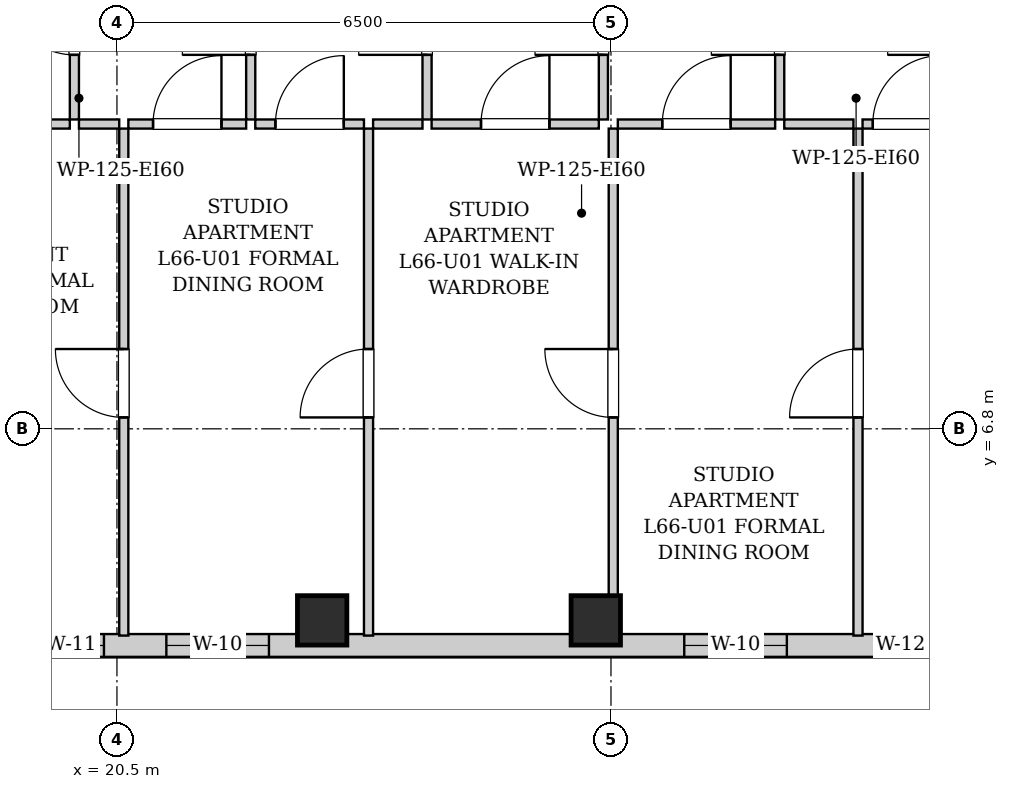
"""IFC4 building model, lengths in metres.
Left out: names, types, materials, properties, quantities, classifications, styles, units other than length and angle.
Written with IfcOpenShell. Run it as: python <this file> out.ifc"""

import sys

from ifc_helpers import new_model, si_unit, direction, frame, frame_2d, origin, origin_2d, place, context, subcontext, project, spatial, rectangle, extrude, element, fill, save


model = new_model("IFC4")
c1 = context("Model", 3, precision=1e-05, world=origin(), true_north=direction((0.0, 1.0)))
c2 = subcontext(c1, "Body", "Model", "MODEL_VIEW")
j1 = project(units=[si_unit("LENGTHUNIT", "METRE"), si_unit("PLANEANGLEUNIT", "RADIAN")], contexts=[c1])
p1 = place(None, origin())
s1 = spatial("IfcSite", under=j1, at=p1, CompositionType="ELEMENT")
p2 = place(p1, origin())
s2 = spatial("IfcBuilding", under=s1, at=p2, CompositionType="ELEMENT")
p3 = place(p2, frame((0.0, 0.0, 227.5)))
s3 = spatial("IfcBuildingStorey", under=s2, at=p3, CompositionType="ELEMENT", Elevation=227.5)
for number, where, z_axis, x_axis in (
    (1, (23.2, 4.28, 0.0), (0.0, 0.0, 1.0), (1.0, 0.0, 0.0)),
    (2, (26.8, 4.28, 0.0), (0.0, 0.0, 1.0), (1.0, 0.0, 0.0)),
):
    element("IfcColumn", number, at=place(p3, frame(where, z_axis=z_axis, x_axis=x_axis)), inside=s3, PredefinedType="COLUMN", context=c2, shape_type="SweptSolid", body=[
        extrude(rectangle(XDim=0.65, YDim=0.65, at=origin_2d()), origin(), (0.0, 0.0, 1.0), 3.4),
    ])
p4 = place(p3, frame((31.5, 3.95, 0.0), z_axis=(0.0, 0.0, 1.0), x_axis=(-1.0, 0.0, 0.0)))
e3 = element("IfcWall", 3, at=p4, inside=s3, PredefinedType="SOLIDWALL", context=c2, shape_type="SweptSolid", body=[
    extrude(rectangle(XDim=12.5, YDim=0.3, at=frame_2d((6.25, 0.0))), origin(), (0.0, 0.0, 1.0), 3.14),
])
p5 = place(p4, frame((11.171, 0.0, 0.55)))
e4 = element("IfcOpeningElement", 4, at=p5, cuts=e3, PredefinedType="OPENING", context=c2, shape_type="SweptSolid", body=[
    extrude(rectangle(XDim=0.85, YDim=1.2, at=frame_2d((0.425, 0.6))), frame((0.0, 0.16, 0.0), z_axis=(0.0, -1.0, 0.0), x_axis=(1.0, 0.0, 0.0)), (0.0, 0.0, 1.0), 0.32),
])
p6 = place(p4, frame((9.0, 0.0, 0.55)))
e5 = element("IfcOpeningElement", 5, at=p6, cuts=e3, PredefinedType="OPENING", context=c2, shape_type="SweptSolid", body=[
    extrude(rectangle(XDim=1.35, YDim=1.2, at=frame_2d((0.675, 0.6))), frame((0.0, 0.16, 0.0), z_axis=(0.0, -1.0, 0.0), x_axis=(1.0, 0.0, 0.0)), (0.0, 0.0, 1.0), 0.32),
])
p7 = place(p4, frame((2.186, 0.0, 0.55)))
e6 = element("IfcOpeningElement", 6, at=p7, cuts=e3, PredefinedType="OPENING", context=c2, shape_type="SweptSolid", body=[
    extrude(rectangle(XDim=1.35, YDim=1.2, at=frame_2d((0.675, 0.6))), frame((0.0, 0.16, 0.0), z_axis=(0.0, -1.0, 0.0), x_axis=(1.0, 0.0, 0.0)), (0.0, 0.0, 1.0), 0.32),
])
p8 = place(p4, frame((0.35, 0.0, 0.55)))
e7 = element("IfcOpeningElement", 7, at=p8, cuts=e3, PredefinedType="OPENING", context=c2, shape_type="SweptSolid", body=[
    extrude(rectangle(XDim=0.68, YDim=1.2, at=frame_2d((0.34, 0.6))), frame((0.0, 0.16, 0.0), z_axis=(0.0, -1.0, 0.0), x_axis=(1.0, 0.0, 0.0)), (0.0, 0.0, 1.0), 0.32),
])
p9 = place(p3, frame((19.94, 10.87, 0.0), z_axis=(0.0, 0.0, 1.0), x_axis=(0.0, 1.0, 0.0)))
e8 = element("IfcWall", 8, at=p9, inside=s3, PredefinedType="PARTITIONING", context=c2, shape_type="SweptSolid", body=[
    extrude(rectangle(XDim=2.6, YDim=0.12, at=frame_2d((1.3, 0.0))), origin(), (0.0, 0.0, 1.0), 3.14),
])
p10 = place(p9, frame((0.85, 0.0, 0.0)))
e9 = element("IfcOpeningElement", 9, at=p10, cuts=e8, PredefinedType="OPENING", context=c2, shape_type="SweptSolid", body=[
    extrude(rectangle(XDim=0.9, YDim=2.05, at=frame_2d((0.45, 1.025))), frame((0.0, 0.07, 0.0), z_axis=(0.0, -1.0, 0.0), x_axis=(1.0, 0.0, 0.0)), (0.0, 0.0, 1.0), 0.14),
])
p11 = place(p3, frame((17.43, 10.81, 0.0), z_axis=(0.0, 0.0, 1.0), x_axis=(1.0, 0.0, 0.0)))
e10 = element("IfcWall", 10, at=p11, inside=s3, PredefinedType="PARTITIONING", context=c2, shape_type="SweptSolid", body=[
    extrude(rectangle(XDim=2.45, YDim=0.12, at=frame_2d((1.225, 0.0))), origin(), (0.0, 0.0, 1.0), 3.14),
])
p12 = place(p11, frame((0.775, 0.0, 0.0)))
e11 = element("IfcOpeningElement", 11, at=p12, cuts=e10, PredefinedType="OPENING", context=c2, shape_type="SweptSolid", body=[
    extrude(rectangle(XDim=0.9, YDim=2.05, at=frame_2d((0.45, 1.025))), frame((0.0, 0.07, 0.0), z_axis=(0.0, -1.0, 0.0), x_axis=(1.0, 0.0, 0.0)), (0.0, 0.0, 1.0), 0.14),
])
p13 = place(p3, frame((22.26, 10.87, 0.0), z_axis=(0.0, 0.0, 1.0), x_axis=(0.0, 1.0, 0.0)))
e12 = element("IfcWall", 12, at=p13, inside=s3, PredefinedType="PARTITIONING", context=c2, shape_type="SweptSolid", body=[
    extrude(rectangle(XDim=2.6, YDim=0.12, at=frame_2d((1.3, 0.0))), origin(), (0.0, 0.0, 1.0), 3.14),
])
p14 = place(p13, frame((0.85, 0.0, 0.0)))
e13 = element("IfcOpeningElement", 13, at=p14, cuts=e12, PredefinedType="OPENING", context=c2, shape_type="SweptSolid", body=[
    extrude(rectangle(XDim=0.9, YDim=2.05, at=frame_2d((0.45, 1.025))), frame((0.0, 0.07, 0.0), z_axis=(0.0, -1.0, 0.0), x_axis=(1.0, 0.0, 0.0)), (0.0, 0.0, 1.0), 0.14),
])
p15 = place(p3, frame((20.0, 10.81, 0.0), z_axis=(0.0, 0.0, 1.0), x_axis=(1.0, 0.0, 0.0)))
e14 = element("IfcWall", 14, at=p15, inside=s3, PredefinedType="PARTITIONING", context=c2, shape_type="SweptSolid", body=[
    extrude(rectangle(XDim=0.53, YDim=0.12, at=frame_2d((0.265, 0.0))), origin(), (0.0, 0.0, 1.0), 3.14),
])
p16 = place(p3, frame((20.65, 10.81, 0.0), z_axis=(0.0, 0.0, 1.0), x_axis=(1.0, 0.0, 0.0)))
e15 = element("IfcWall", 15, at=p16, inside=s3, PredefinedType="PARTITIONING", context=c2, shape_type="SweptSolid", body=[
    extrude(rectangle(XDim=1.55, YDim=0.12, at=frame_2d((0.775, 0.0))), origin(), (0.0, 0.0, 1.0), 3.14),
])
p17 = place(p16, frame((0.325, 0.0, 0.0)))
e16 = element("IfcOpeningElement", 16, at=p17, cuts=e15, PredefinedType="OPENING", context=c2, shape_type="SweptSolid", body=[
    extrude(rectangle(XDim=0.9, YDim=2.05, at=frame_2d((0.45, 1.025))), frame((0.0, 0.07, 0.0), z_axis=(0.0, -1.0, 0.0), x_axis=(1.0, 0.0, 0.0)), (0.0, 0.0, 1.0), 0.14),
])
p18 = place(p3, frame((24.58, 10.87, 0.0), z_axis=(0.0, 0.0, 1.0), x_axis=(0.0, 1.0, 0.0)))
e17 = element("IfcWall", 17, at=p18, inside=s3, PredefinedType="PARTITIONING", context=c2, shape_type="SweptSolid", body=[
    extrude(rectangle(XDim=2.6, YDim=0.12, at=frame_2d((1.3, 0.0))), origin(), (0.0, 0.0, 1.0), 3.14),
])
p19 = place(p18, frame((0.85, 0.0, 0.0)))
e18 = element("IfcOpeningElement", 18, at=p19, cuts=e17, PredefinedType="OPENING", context=c2, shape_type="SweptSolid", body=[
    extrude(rectangle(XDim=0.9, YDim=2.05, at=frame_2d((0.45, 1.025))), frame((0.0, 0.07, 0.0), z_axis=(0.0, -1.0, 0.0), x_axis=(1.0, 0.0, 0.0)), (0.0, 0.0, 1.0), 0.14),
])
p20 = place(p3, frame((22.32, 10.81, 0.0), z_axis=(0.0, 0.0, 1.0), x_axis=(1.0, 0.0, 0.0)))
e19 = element("IfcWall", 19, at=p20, inside=s3, PredefinedType="PARTITIONING", context=c2, shape_type="SweptSolid", body=[
    extrude(rectangle(XDim=1.43, YDim=0.12, at=frame_2d((0.715, 0.0))), origin(), (0.0, 0.0, 1.0), 3.14),
])
p21 = place(p20, frame((0.265, 0.0, 0.0)))
e20 = element("IfcOpeningElement", 20, at=p21, cuts=e19, PredefinedType="OPENING", context=c2, shape_type="SweptSolid", body=[
    extrude(rectangle(XDim=0.9, YDim=2.05, at=frame_2d((0.45, 1.025))), frame((0.0, 0.07, 0.0), z_axis=(0.0, -1.0, 0.0), x_axis=(1.0, 0.0, 0.0)), (0.0, 0.0, 1.0), 0.14),
])
p22 = place(p3, frame((23.87, 10.81, 0.0), z_axis=(0.0, 0.0, 1.0), x_axis=(1.0, 0.0, 0.0)))
e21 = element("IfcWall", 21, at=p22, inside=s3, PredefinedType="PARTITIONING", context=c2, shape_type="SweptSolid", body=[
    extrude(rectangle(XDim=0.65, YDim=0.12, at=frame_2d((0.325, 0.0))), origin(), (0.0, 0.0, 1.0), 3.14),
])
p23 = place(p3, frame((26.9, 10.87, 0.0), z_axis=(0.0, 0.0, 1.0), x_axis=(0.0, 1.0, 0.0)))
e22 = element("IfcWall", 22, at=p23, inside=s3, PredefinedType="PARTITIONING", context=c2, shape_type="SweptSolid", body=[
    extrude(rectangle(XDim=2.6, YDim=0.12, at=frame_2d((1.3, 0.0))), origin(), (0.0, 0.0, 1.0), 3.14),
])
p24 = place(p23, frame((0.85, 0.0, 0.0)))
e23 = element("IfcOpeningElement", 23, at=p24, cuts=e22, PredefinedType="OPENING", context=c2, shape_type="SweptSolid", body=[
    extrude(rectangle(XDim=0.9, YDim=2.05, at=frame_2d((0.45, 1.025))), frame((0.0, 0.07, 0.0), z_axis=(0.0, -1.0, 0.0), x_axis=(1.0, 0.0, 0.0)), (0.0, 0.0, 1.0), 0.14),
])
p25 = place(p3, frame((24.64, 10.81, 0.0), z_axis=(0.0, 0.0, 1.0), x_axis=(1.0, 0.0, 0.0)))
e24 = element("IfcWall", 24, at=p25, inside=s3, PredefinedType="PARTITIONING", context=c2, shape_type="SweptSolid", body=[
    extrude(rectangle(XDim=2.2, YDim=0.12, at=frame_2d((1.1, 0.0))), origin(), (0.0, 0.0, 1.0), 3.14),
])
p26 = place(p25, frame((0.65, 0.0, 0.0)))
e25 = element("IfcOpeningElement", 25, at=p26, cuts=e24, PredefinedType="OPENING", context=c2, shape_type="SweptSolid", body=[
    extrude(rectangle(XDim=0.9, YDim=2.05, at=frame_2d((0.45, 1.025))), frame((0.0, 0.07, 0.0), z_axis=(0.0, -1.0, 0.0), x_axis=(1.0, 0.0, 0.0)), (0.0, 0.0, 1.0), 0.14),
])
p27 = place(p3, frame((29.22, 10.87, 0.0), z_axis=(0.0, 0.0, 1.0), x_axis=(0.0, 1.0, 0.0)))
e26 = element("IfcWall", 26, at=p27, inside=s3, PredefinedType="PARTITIONING", context=c2, shape_type="SweptSolid", body=[
    extrude(rectangle(XDim=2.6, YDim=0.12, at=frame_2d((1.3, 0.0))), origin(), (0.0, 0.0, 1.0), 3.14),
])
p28 = place(p27, frame((0.85, 0.0, 0.0)))
e27 = element("IfcOpeningElement", 27, at=p28, cuts=e26, PredefinedType="OPENING", context=c2, shape_type="SweptSolid", body=[
    extrude(rectangle(XDim=0.9, YDim=2.05, at=frame_2d((0.45, 1.025))), frame((0.0, 0.07, 0.0), z_axis=(0.0, -1.0, 0.0), x_axis=(1.0, 0.0, 0.0)), (0.0, 0.0, 1.0), 0.14),
])
p29 = place(p3, frame((27.09, 10.81, 0.0), z_axis=(0.0, 0.0, 1.0), x_axis=(1.0, 0.0, 0.0)))
e28 = element("IfcWall", 28, at=p29, inside=s3, PredefinedType="PARTITIONING", context=c2, shape_type="SweptSolid", body=[
    extrude(rectangle(XDim=2.07, YDim=0.12, at=frame_2d((1.035, 0.0))), origin(), (0.0, 0.0, 1.0), 3.14),
])
p30 = place(p29, frame((0.585, 0.0, 0.0)))
e29 = element("IfcOpeningElement", 29, at=p30, cuts=e28, PredefinedType="OPENING", context=c2, shape_type="SweptSolid", body=[
    extrude(rectangle(XDim=0.9, YDim=2.05, at=frame_2d((0.45, 1.025))), frame((0.0, 0.07, 0.0), z_axis=(0.0, -1.0, 0.0), x_axis=(1.0, 0.0, 0.0)), (0.0, 0.0, 1.0), 0.14),
])
p31 = place(p3, frame((29.28, 10.81, 0.0), z_axis=(0.0, 0.0, 1.0), x_axis=(1.0, 0.0, 0.0)))
e30 = element("IfcWall", 30, at=p31, inside=s3, PredefinedType="PARTITIONING", context=c2, shape_type="SweptSolid", body=[
    extrude(rectangle(XDim=0.91, YDim=0.12, at=frame_2d((0.455, 0.0))), origin(), (0.0, 0.0, 1.0), 3.14),
])
p32 = place(p3, frame((30.31, 10.81, 0.0), z_axis=(0.0, 0.0, 1.0), x_axis=(1.0, 0.0, 0.0)))
e31 = element("IfcWall", 31, at=p32, inside=s3, PredefinedType="PARTITIONING", context=c2, shape_type="SweptSolid", body=[
    extrude(rectangle(XDim=1.17, YDim=0.12, at=frame_2d((0.585, 0.0))), origin(), (0.0, 0.0, 1.0), 3.14),
])
p33 = place(p32, frame((0.135, 0.0, 0.0)))
e32 = element("IfcOpeningElement", 32, at=p33, cuts=e31, PredefinedType="OPENING", context=c2, shape_type="SweptSolid", body=[
    extrude(rectangle(XDim=0.9, YDim=2.05, at=frame_2d((0.45, 1.025))), frame((0.0, 0.07, 0.0), z_axis=(0.0, -1.0, 0.0), x_axis=(1.0, 0.0, 0.0)), (0.0, 0.0, 1.0), 0.14),
])
p34 = place(p3, frame((20.59, 4.08, 0.0), z_axis=(0.0, 0.0, 1.0), x_axis=(0.0, 1.0, 0.0)))
e33 = element("IfcWall", 33, at=p34, inside=s3, PredefinedType="PARTITIONING", context=c2, shape_type="SweptSolid", body=[
    extrude(rectangle(XDim=6.67, YDim=0.12, at=frame_2d((3.335, 0.0))), origin(), (0.0, 0.0, 1.0), 3.14),
])
p35 = place(p34, frame((2.87, 0.0, 0.0)))
e34 = element("IfcOpeningElement", 34, at=p35, cuts=e33, PredefinedType="OPENING", context=c2, shape_type="SweptSolid", body=[
    extrude(rectangle(XDim=0.9, YDim=2.05, at=frame_2d((0.45, 1.025))), frame((0.0, 0.07, 0.0), z_axis=(0.0, -1.0, 0.0), x_axis=(1.0, 0.0, 0.0)), (0.0, 0.0, 1.0), 0.14),
])
p36 = place(p3, frame((23.81, 4.08, 0.0), z_axis=(0.0, 0.0, 1.0), x_axis=(0.0, 1.0, 0.0)))
e35 = element("IfcWall", 35, at=p36, inside=s3, PredefinedType="PARTITIONING", context=c2, shape_type="SweptSolid", body=[
    extrude(rectangle(XDim=6.67, YDim=0.12, at=frame_2d((3.335, 0.0))), origin(), (0.0, 0.0, 1.0), 3.14),
])
p37 = place(p36, frame((2.87, 0.0, 0.0)))
e36 = element("IfcOpeningElement", 36, at=p37, cuts=e35, PredefinedType="OPENING", context=c2, shape_type="SweptSolid", body=[
    extrude(rectangle(XDim=0.9, YDim=2.05, at=frame_2d((0.45, 1.025))), frame((0.0, 0.07, 0.0), z_axis=(0.0, -1.0, 0.0), x_axis=(1.0, 0.0, 0.0)), (0.0, 0.0, 1.0), 0.14),
])
p38 = place(p3, frame((27.03, 4.08, 0.0), z_axis=(0.0, 0.0, 1.0), x_axis=(0.0, 1.0, 0.0)))
e37 = element("IfcWall", 37, at=p38, inside=s3, PredefinedType="PARTITIONING", context=c2, shape_type="SweptSolid", body=[
    extrude(rectangle(XDim=6.67, YDim=0.12, at=frame_2d((3.335, 0.0))), origin(), (0.0, 0.0, 1.0), 3.14),
])
p39 = place(p38, frame((2.87, 0.0, 0.0)))
e38 = element("IfcOpeningElement", 38, at=p39, cuts=e37, PredefinedType="OPENING", context=c2, shape_type="SweptSolid", body=[
    extrude(rectangle(XDim=0.9, YDim=2.05, at=frame_2d((0.45, 1.025))), frame((0.0, 0.07, 0.0), z_axis=(0.0, -1.0, 0.0), x_axis=(1.0, 0.0, 0.0)), (0.0, 0.0, 1.0), 0.14),
])
p40 = place(p3, frame((30.25, 4.08, 0.0), z_axis=(0.0, 0.0, 1.0), x_axis=(0.0, 1.0, 0.0)))
e39 = element("IfcWall", 39, at=p40, inside=s3, PredefinedType="PARTITIONING", context=c2, shape_type="SweptSolid", body=[
    extrude(rectangle(XDim=6.67, YDim=0.12, at=frame_2d((3.335, 0.0))), origin(), (0.0, 0.0, 1.0), 3.14),
])
p41 = place(p40, frame((2.87, 0.0, 0.0)))
e40 = element("IfcOpeningElement", 40, at=p41, cuts=e39, PredefinedType="OPENING", context=c2, shape_type="SweptSolid", body=[
    extrude(rectangle(XDim=0.9, YDim=2.05, at=frame_2d((0.45, 1.025))), frame((0.0, 0.07, 0.0), z_axis=(0.0, -1.0, 0.0), x_axis=(1.0, 0.0, 0.0)), (0.0, 0.0, 1.0), 0.14),
])
p42 = place(p10, origin())
e41 = element("IfcDoor", 41, at=p42, inside=s3, OperationType="SINGLE_SWING_RIGHT", PredefinedType="DOOR", context=c2, shape_type="SweptSolid", body=[
    extrude(rectangle(XDim=0.9, YDim=2.05, at=frame_2d((0.45, 1.025))), frame((0.0, 0.025, 0.0), z_axis=(0.0, -1.0, 0.0), x_axis=(1.0, 0.0, 0.0)), (0.0, 0.0, 1.0), 0.05),
])
fill(e9, e41)
p43 = place(p14, origin())
e42 = element("IfcDoor", 42, at=p43, inside=s3, OperationType="SINGLE_SWING_LEFT", PredefinedType="DOOR", context=c2, shape_type="SweptSolid", body=[
    extrude(rectangle(XDim=0.9, YDim=2.05, at=frame_2d((0.45, 1.025))), frame((0.0, 0.025, 0.0), z_axis=(0.0, -1.0, 0.0), x_axis=(1.0, 0.0, 0.0)), (0.0, 0.0, 1.0), 0.05),
])
fill(e13, e42)
p44 = place(p17, origin())
e43 = element("IfcDoor", 43, at=p44, inside=s3, OperationType="SINGLE_SWING_RIGHT", PredefinedType="DOOR", context=c2, shape_type="SweptSolid", body=[
    extrude(rectangle(XDim=0.9, YDim=2.05, at=frame_2d((0.45, 1.025))), frame((0.0, 0.025, 0.0), z_axis=(0.0, -1.0, 0.0), x_axis=(1.0, 0.0, 0.0)), (0.0, 0.0, 1.0), 0.05),
])
fill(e16, e43)
p45 = place(p19, origin())
e44 = element("IfcDoor", 44, at=p45, inside=s3, OperationType="SINGLE_SWING_LEFT", PredefinedType="DOOR", context=c2, shape_type="SweptSolid", body=[
    extrude(rectangle(XDim=0.9, YDim=2.05, at=frame_2d((0.45, 1.025))), frame((0.0, 0.025, 0.0), z_axis=(0.0, -1.0, 0.0), x_axis=(1.0, 0.0, 0.0)), (0.0, 0.0, 1.0), 0.05),
])
fill(e18, e44)
p46 = place(p21, origin())
e45 = element("IfcDoor", 45, at=p46, inside=s3, OperationType="SINGLE_SWING_RIGHT", PredefinedType="DOOR", context=c2, shape_type="SweptSolid", body=[
    extrude(rectangle(XDim=0.9, YDim=2.05, at=frame_2d((0.45, 1.025))), frame((0.0, 0.025, 0.0), z_axis=(0.0, -1.0, 0.0), x_axis=(1.0, 0.0, 0.0)), (0.0, 0.0, 1.0), 0.05),
])
fill(e20, e45)
p47 = place(p24, origin())
e46 = element("IfcDoor", 46, at=p47, inside=s3, OperationType="SINGLE_SWING_LEFT", PredefinedType="DOOR", context=c2, shape_type="SweptSolid", body=[
    extrude(rectangle(XDim=0.9, YDim=2.05, at=frame_2d((0.45, 1.025))), frame((0.0, 0.025, 0.0), z_axis=(0.0, -1.0, 0.0), x_axis=(1.0, 0.0, 0.0)), (0.0, 0.0, 1.0), 0.05),
])
fill(e23, e46)
p48 = place(p26, origin())
e47 = element("IfcDoor", 47, at=p48, inside=s3, OperationType="SINGLE_SWING_RIGHT", PredefinedType="DOOR", context=c2, shape_type="SweptSolid", body=[
    extrude(rectangle(XDim=0.9, YDim=2.05, at=frame_2d((0.45, 1.025))), frame((0.0, 0.025, 0.0), z_axis=(0.0, -1.0, 0.0), x_axis=(1.0, 0.0, 0.0)), (0.0, 0.0, 1.0), 0.05),
])
fill(e25, e47)
p49 = place(p28, origin())
e48 = element("IfcDoor", 48, at=p49, inside=s3, OperationType="SINGLE_SWING_LEFT", PredefinedType="DOOR", context=c2, shape_type="SweptSolid", body=[
    extrude(rectangle(XDim=0.9, YDim=2.05, at=frame_2d((0.45, 1.025))), frame((0.0, 0.025, 0.0), z_axis=(0.0, -1.0, 0.0), x_axis=(1.0, 0.0, 0.0)), (0.0, 0.0, 1.0), 0.05),
])
fill(e27, e48)
p50 = place(p30, origin())
e49 = element("IfcDoor", 49, at=p50, inside=s3, OperationType="SINGLE_SWING_RIGHT", PredefinedType="DOOR", context=c2, shape_type="SweptSolid", body=[
    extrude(rectangle(XDim=0.9, YDim=2.05, at=frame_2d((0.45, 1.025))), frame((0.0, 0.025, 0.0), z_axis=(0.0, -1.0, 0.0), x_axis=(1.0, 0.0, 0.0)), (0.0, 0.0, 1.0), 0.05),
])
fill(e29, e49)
p51 = place(p33, origin())
e50 = element("IfcDoor", 50, at=p51, inside=s3, OperationType="SINGLE_SWING_RIGHT", PredefinedType="DOOR", context=c2, shape_type="SweptSolid", body=[
    extrude(rectangle(XDim=0.9, YDim=2.05, at=frame_2d((0.45, 1.025))), frame((0.0, 0.025, 0.0), z_axis=(0.0, -1.0, 0.0), x_axis=(1.0, 0.0, 0.0)), (0.0, 0.0, 1.0), 0.05),
])
fill(e32, e50)
p52 = place(p35, origin())
e51 = element("IfcDoor", 51, at=p52, inside=s3, OperationType="SINGLE_SWING_RIGHT", PredefinedType="DOOR", context=c2, shape_type="SweptSolid", body=[
    extrude(rectangle(XDim=0.9, YDim=2.05, at=frame_2d((0.45, 1.025))), frame((0.0, 0.025, 0.0), z_axis=(0.0, -1.0, 0.0), x_axis=(1.0, 0.0, 0.0)), (0.0, 0.0, 1.0), 0.05),
])
fill(e34, e51)
p53 = place(p37, origin())
e52 = element("IfcDoor", 52, at=p53, inside=s3, OperationType="SINGLE_SWING_LEFT", PredefinedType="DOOR", context=c2, shape_type="SweptSolid", body=[
    extrude(rectangle(XDim=0.9, YDim=2.05, at=frame_2d((0.45, 1.025))), frame((0.0, 0.025, 0.0), z_axis=(0.0, -1.0, 0.0), x_axis=(1.0, 0.0, 0.0)), (0.0, 0.0, 1.0), 0.05),
])
fill(e36, e52)
p54 = place(p39, origin())
e53 = element("IfcDoor", 53, at=p54, inside=s3, OperationType="SINGLE_SWING_RIGHT", PredefinedType="DOOR", context=c2, shape_type="SweptSolid", body=[
    extrude(rectangle(XDim=0.9, YDim=2.05, at=frame_2d((0.45, 1.025))), frame((0.0, 0.025, 0.0), z_axis=(0.0, -1.0, 0.0), x_axis=(1.0, 0.0, 0.0)), (0.0, 0.0, 1.0), 0.05),
])
fill(e38, e53)
p55 = place(p41, origin())
e54 = element("IfcDoor", 54, at=p55, inside=s3, OperationType="SINGLE_SWING_LEFT", PredefinedType="DOOR", context=c2, shape_type="SweptSolid", body=[
    extrude(rectangle(XDim=0.9, YDim=2.05, at=frame_2d((0.45, 1.025))), frame((0.0, 0.025, 0.0), z_axis=(0.0, -1.0, 0.0), x_axis=(1.0, 0.0, 0.0)), (0.0, 0.0, 1.0), 0.05),
])
fill(e40, e54)
p56 = place(p5, origin())
e55 = element("IfcWindow", 55, at=p56, inside=s3, PartitioningType="SINGLE_PANEL", PredefinedType="WINDOW", context=c2, shape_type="SweptSolid", body=[
    extrude(rectangle(XDim=0.85, YDim=1.2, at=frame_2d((0.425, 0.6))), frame((0.0, 0.03, 0.0), z_axis=(0.0, -1.0, 0.0), x_axis=(1.0, 0.0, 0.0)), (0.0, 0.0, 1.0), 0.06),
])
fill(e4, e55)
p57 = place(p6, origin())
e56 = element("IfcWindow", 56, at=p57, inside=s3, PartitioningType="SINGLE_PANEL", PredefinedType="WINDOW", context=c2, shape_type="SweptSolid", body=[
    extrude(rectangle(XDim=1.35, YDim=1.2, at=frame_2d((0.675, 0.6))), frame((0.0, 0.03, 0.0), z_axis=(0.0, -1.0, 0.0), x_axis=(1.0, 0.0, 0.0)), (0.0, 0.0, 1.0), 0.06),
])
fill(e5, e56)
p58 = place(p7, origin())
e57 = element("IfcWindow", 57, at=p58, inside=s3, PartitioningType="SINGLE_PANEL", PredefinedType="WINDOW", context=c2, shape_type="SweptSolid", body=[
    extrude(rectangle(XDim=1.35, YDim=1.2, at=frame_2d((0.675, 0.6))), frame((0.0, 0.03, 0.0), z_axis=(0.0, -1.0, 0.0), x_axis=(1.0, 0.0, 0.0)), (0.0, 0.0, 1.0), 0.06),
])
fill(e6, e57)
p59 = place(p8, origin())
e58 = element("IfcWindow", 58, at=p59, inside=s3, PartitioningType="SINGLE_PANEL", PredefinedType="WINDOW", context=c2, shape_type="SweptSolid", body=[
    extrude(rectangle(XDim=0.68, YDim=1.2, at=frame_2d((0.34, 0.6))), frame((0.0, 0.03, 0.0), z_axis=(0.0, -1.0, 0.0), x_axis=(1.0, 0.0, 0.0)), (0.0, 0.0, 1.0), 0.06),
])
fill(e7, e58)
save(model, sys.argv[1])
